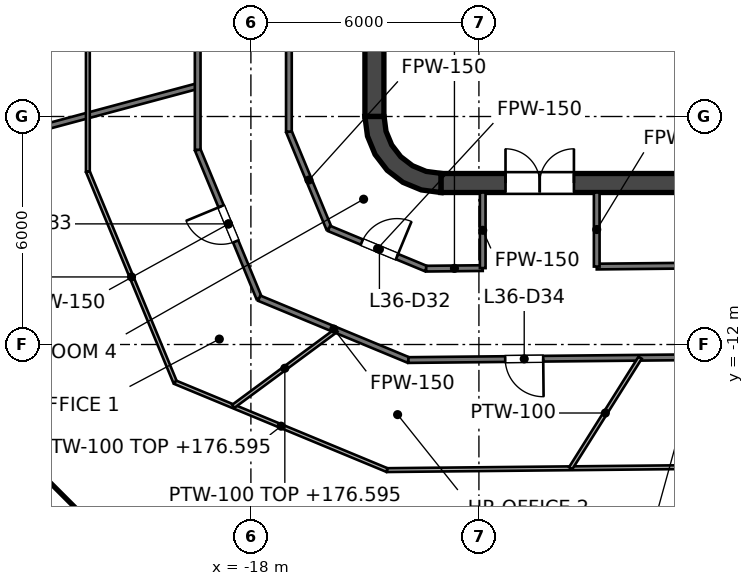
"""IFC4 building model, lengths in metres.
Left out: names, types, materials, properties, quantities, classifications, styles, units other than length and angle.
Written with IfcOpenShell. Run it as: python <this file> out.ifc"""

import sys

from ifc_helpers import new_model, si_unit, direction, frame, frame_2d, origin, place, context, subcontext, project, spatial, polyline, rectangle, outline, extrude, element, fill, save


model = new_model("IFC4")
c1 = context("Model", 3, precision=1e-05, world=origin(), true_north=direction((0.0, 1.0)))
c2 = subcontext(c1, "Body", "Model", "MODEL_VIEW")
j1 = project(units=[si_unit("LENGTHUNIT", "METRE"), si_unit("PLANEANGLEUNIT", "RADIAN")], contexts=[c1])
p1 = place(None, origin())
s1 = spatial("IfcSite", under=j1, at=p1, CompositionType="ELEMENT")
p2 = place(p1, origin())
s2 = spatial("IfcBuilding", under=s1, at=p2, CompositionType="ELEMENT")
p3 = place(p2, frame((0.0, 0.0, 173.6)))
s3 = spatial("IfcBuildingStorey", under=s2, at=p3, CompositionType="ELEMENT", Elevation=173.6)
p4 = place(p3, frame((-13.0, -7.75, 0.0), z_axis=(0.0, 0.0, 1.0), x_axis=(1.0, 0.0, 0.0)))
e1 = element("IfcWall", 1, at=p4, inside=s3, PredefinedType="SHEAR", context=c2, shape_type="SweptSolid", body=[
    extrude(rectangle(XDim=26.0, YDim=0.5, at=frame_2d((13.0, 0.0))), origin(), (0.0, 0.0, 1.0), 4.0),
])
p5 = place(p4, frame((1.7, 0.0, 0.0)))
e2 = element("IfcOpeningElement", 2, at=p5, cuts=e1, PredefinedType="OPENING", context=c2, shape_type="SweptSolid", body=[
    extrude(rectangle(XDim=1.8, YDim=2.1, at=frame_2d((0.9, 1.05))), frame((0.0, 0.25, 0.0), z_axis=(0.0, -1.0, 0.0), x_axis=(1.0, 0.0, 0.0)), (0.0, 0.0, 1.0), 0.5),
])
p6 = place(p4, frame((22.5, 0.0, 0.0)))
e3 = element("IfcOpeningElement", 3, at=p6, cuts=e1, PredefinedType="OPENING", context=c2, shape_type="SweptSolid", body=[
    extrude(rectangle(XDim=1.8, YDim=2.1, at=frame_2d((0.9, 1.05))), frame((0.0, 0.25, 0.0), z_axis=(0.0, -1.0, 0.0), x_axis=(1.0, 0.0, 0.0)), (0.0, 0.0, 1.0), 0.5),
])
p7 = place(p3, frame((-14.75, -6.0, 0.0), z_axis=(0.0, 0.0, 1.0), x_axis=(0.0, 1.0, 0.0)))
e4 = element("IfcWall", 4, at=p7, inside=s3, PredefinedType="SHEAR", context=c2, shape_type="SweptSolid", body=[
    extrude(rectangle(XDim=12.0, YDim=0.5, at=frame_2d((6.0, 0.0))), origin(), (0.0, 0.0, 1.0), 4.0),
])
p8 = place(p3, origin())
e5 = element("IfcWall", 5, at=p8, inside=s3, PredefinedType="SHEAR", context=c2, shape_type="SweptSolid", body=[
    extrude(outline(polyline([(-13.0, -8.0), (-13.0, -7.496), (-13.387, -7.445), (-13.748, -7.295), (-14.058, -7.058), (-14.295, -6.748), (-14.445, -6.387), (-14.496, -6.0), (-15.0, -6.0), (-14.932, -6.518), (-14.732, -7.0), (-14.414, -7.414), (-14.0, -7.732), (-13.518, -7.932), (-13.0, -8.0)])), origin(), (0.0, 0.0, 1.0), 4.0),
])
p9 = place(p3, frame((-9.0, -6.6, 0.0), z_axis=(0.0, 0.0, 1.0), x_axis=(0.0, 1.0, 0.0)))
e6 = element("IfcWall", 6, at=p9, inside=s3, PredefinedType="PARTITIONING", context=c2, shape_type="SweptSolid", body=[
    extrude(rectangle(XDim=2.5, YDim=0.25, at=frame_2d((1.25, 0.0))), origin(), (0.0, 0.0, 1.0), 3.85),
])
p10 = place(p9, frame((0.75, 0.0, 0.0)))
e7 = element("IfcOpeningElement", 7, at=p10, cuts=e6, PredefinedType="OPENING", context=c2, shape_type="SweptSolid", body=[
    extrude(rectangle(XDim=1.0, YDim=2.1, at=frame_2d((0.5, 1.05))), frame((0.0, 0.125, 0.0), z_axis=(0.0, -1.0, 0.0), x_axis=(1.0, 0.0, 0.0)), (0.0, 0.0, 1.0), 0.25),
])
p11 = place(p3, frame((-9.125, -7.05, 0.0), z_axis=(0.0, 0.0, 1.0), x_axis=(1.0, 0.0, 0.0)))
e8 = element("IfcWall", 8, at=p11, inside=s3, PredefinedType="SOLIDWALL", context=c2, shape_type="SweptSolid", body=[
    extrude(rectangle(XDim=18.25, YDim=0.9, at=frame_2d((9.125, 0.0))), origin(), (0.0, 0.0, 1.0), 3.85),
])
p12 = place(p3, frame((-11.8, -7.5, 0.0), z_axis=(0.0, 0.0, 1.0), x_axis=(0.0, 1.0, 0.0)))
e9 = element("IfcWall", 9, at=p12, inside=s3, PredefinedType="SOLIDWALL", context=c2, shape_type="SweptSolid", body=[
    extrude(rectangle(XDim=15.0, YDim=0.4, at=frame_2d((7.5, 0.0))), origin(), (0.0, 0.0, 1.0), 3.85),
])
p13 = place(p12, frame((11.3, 0.0, 0.0)))
e10 = element("IfcOpeningElement", 10, at=p13, cuts=e9, PredefinedType="OPENING", context=c2, shape_type="SweptSolid", body=[
    extrude(rectangle(XDim=1.1, YDim=2.1, at=frame_2d((0.55, 1.05))), frame((0.0, 0.2, 0.0), z_axis=(0.0, -1.0, 0.0), x_axis=(1.0, 0.0, 0.0)), (0.0, 0.0, 1.0), 0.4),
])
p14 = place(p12, frame((8.4, 0.0, 0.0)))
e11 = element("IfcOpeningElement", 11, at=p14, cuts=e9, PredefinedType="OPENING", context=c2, shape_type="SweptSolid", body=[
    extrude(rectangle(XDim=1.1, YDim=2.1, at=frame_2d((0.55, 1.05))), frame((0.0, 0.2, 0.0), z_axis=(0.0, -1.0, 0.0), x_axis=(1.0, 0.0, 0.0)), (0.0, 0.0, 1.0), 0.4),
])
p15 = place(p12, frame((5.5, 0.0, 0.0)))
e12 = element("IfcOpeningElement", 12, at=p15, cuts=e9, PredefinedType="OPENING", context=c2, shape_type="SweptSolid", body=[
    extrude(rectangle(XDim=1.1, YDim=2.1, at=frame_2d((0.55, 1.05))), frame((0.0, 0.2, 0.0), z_axis=(0.0, -1.0, 0.0), x_axis=(1.0, 0.0, 0.0)), (0.0, 0.0, 1.0), 0.4),
])
p16 = place(p12, frame((13.697, 0.0, 0.0)))
e13 = element("IfcOpeningElement", 13, at=p16, cuts=e9, PredefinedType="OPENING", context=c2, shape_type="SweptSolid", body=[
    extrude(rectangle(XDim=0.9, YDim=2.1, at=frame_2d((0.45, 1.05))), frame((0.0, 0.2, 0.0), z_axis=(0.0, -1.0, 0.0), x_axis=(1.0, 0.0, 0.0)), (0.0, 0.0, 1.0), 0.4),
])
p17 = place(p12, frame((0.403, 0.0, 0.0)))
e14 = element("IfcOpeningElement", 14, at=p17, cuts=e9, PredefinedType="OPENING", context=c2, shape_type="SweptSolid", body=[
    extrude(rectangle(XDim=0.9, YDim=2.1, at=frame_2d((0.45, 1.05))), frame((0.0, 0.2, 0.0), z_axis=(0.0, -1.0, 0.0), x_axis=(1.0, 0.0, 0.0)), (0.0, 0.0, 1.0), 0.4),
])
e15 = element("IfcWall", 15, at=p8, inside=s3, PredefinedType="SOLIDWALL", context=c2, shape_type="SweptSolid", body=[
    extrude(outline(polyline([(-12.0, -5.925), (-12.0, -5.675), (-14.25, -5.675), (-14.25, -3.025), (-12.0, -3.025), (-12.0, -2.775), (-14.25, -2.775), (-14.25, -0.125), (-12.0, -0.125), (-12.0, 0.125), (-14.25, 0.125), (-14.25, 2.775), (-12.0, 2.775), (-12.0, 3.025), (-14.25, 3.025), (-14.25, 5.675), (-12.0, 5.675), (-12.0, 5.925), (-14.25, 5.925), (-14.5, 5.925), (-14.5, 5.675), (-14.5, 3.025), (-14.5, 2.775), (-14.5, 0.125), (-14.5, -0.125), (-14.5, -2.775), (-14.5, -3.025), (-14.5, -5.675), (-14.5, -5.925), (-14.25, -5.925), (-12.0, -5.925)])), origin(), (0.0, 0.0, 1.0), 3.85),
])
p18 = place(p3, frame((-19.4, -6.876, 0.0), z_axis=(0.0, 0.0, 1.0), x_axis=(0.382843135608, -0.92381336509, 0.0)))
e16 = element("IfcWall", 16, at=p18, inside=s3, PredefinedType="PARTITIONING", context=c2, shape_type="SweptSolid", body=[
    extrude(rectangle(XDim=4.227, YDim=0.15, at=frame_2d((2.114, 0.0))), origin(), (0.0, 0.0, 1.0), 2.995),
])
p19 = place(p18, frame((1.61, 0.0, 0.0)))
e17 = element("IfcOpeningElement", 17, at=p19, cuts=e16, PredefinedType="OPENING", context=c2, shape_type="SweptSolid", body=[
    extrude(rectangle(XDim=1.0, YDim=2.1, at=frame_2d((0.5, 1.05))), frame((0.0, 0.075, 0.0), z_axis=(0.0, -1.0, 0.0), x_axis=(1.0, 0.0, 0.0)), (0.0, 0.0, 1.0), 0.15),
])
p20 = place(p3, frame((-17.0, -6.398, 0.0), z_axis=(0.0, 0.0, 1.0), x_axis=(0.382828866893, -0.923819278146, 0.0)))
e18 = element("IfcWall", 18, at=p20, inside=s3, PredefinedType="PARTITIONING", context=c2, shape_type="SweptSolid", body=[
    extrude(rectangle(XDim=2.757, YDim=0.15, at=frame_2d((1.378, 0.0))), origin(), (0.0, 0.0, 1.0), 2.995),
])
p21 = place(p3, frame((-17.781, -10.781, 0.0), z_axis=(0.0, 0.0, 1.0), x_axis=(0.923785728675, -0.3829098164, 0.0)))
e19 = element("IfcWall", 19, at=p21, inside=s3, PredefinedType="PARTITIONING", context=c2, shape_type="SweptSolid", body=[
    extrude(rectangle(XDim=4.25, YDim=0.15, at=frame_2d((2.125, 0.0))), origin(), (0.0, 0.0, 1.0), 2.995),
])
p22 = place(p3, frame((-15.945, -8.945, 0.0), z_axis=(0.0, 0.0, 1.0), x_axis=(0.92378777743, -0.382904873658, 0.0)))
e20 = element("IfcWall", 20, at=p22, inside=s3, PredefinedType="PARTITIONING", context=c2, shape_type="SweptSolid", body=[
    extrude(rectangle(XDim=2.768, YDim=0.15, at=frame_2d((1.384, 0.0))), origin(), (0.0, 0.0, 1.0), 2.995),
])
p23 = place(p22, frame((0.936, 0.0, 0.0)))
e21 = element("IfcOpeningElement", 21, at=p23, cuts=e20, PredefinedType="OPENING", context=c2, shape_type="SweptSolid", body=[
    extrude(rectangle(XDim=1.0, YDim=2.1, at=frame_2d((0.5, 1.05))), frame((0.0, 0.075, 0.0), z_axis=(0.0, -1.0, 0.0), x_axis=(1.0, 0.0, 0.0)), (0.0, 0.0, 1.0), 0.15),
])
p24 = place(p3, frame((-13.855, -12.409, 0.0), z_axis=(0.0, 0.0, 1.0), x_axis=(0.999950929766, 0.009906465589, 0.0)))
e22 = element("IfcWall", 22, at=p24, inside=s3, PredefinedType="PARTITIONING", context=c2, shape_type="SweptSolid", body=[
    extrude(rectangle(XDim=30.411, YDim=0.15, at=frame_2d((15.206, 0.0))), origin(), (0.0, 0.0, 1.0), 2.927),
])
p25 = place(p24, frame((2.547, 0.0, 0.0)))
e23 = element("IfcOpeningElement", 23, at=p25, cuts=e22, PredefinedType="OPENING", context=c2, shape_type="SweptSolid", body=[
    extrude(rectangle(XDim=1.0, YDim=2.1, at=frame_2d((0.5, 1.05))), frame((0.0, 0.075, 0.0), z_axis=(0.0, -1.0, 0.0), x_axis=(1.0, 0.0, 0.0)), (0.0, 0.0, 1.0), 0.15),
])
p26 = place(p24, frame((9.526, 0.0, 0.0)))
e24 = element("IfcOpeningElement", 24, at=p26, cuts=e22, PredefinedType="OPENING", context=c2, shape_type="SweptSolid", body=[
    extrude(rectangle(XDim=1.0, YDim=2.1, at=frame_2d((0.5, 1.05))), frame((0.0, 0.075, 0.0), z_axis=(0.0, -1.0, 0.0), x_axis=(1.0, 0.0, 0.0)), (0.0, 0.0, 1.0), 0.15),
])
p27 = place(p24, frame((14.419, 0.0, 0.0)))
e25 = element("IfcOpeningElement", 25, at=p27, cuts=e22, PredefinedType="OPENING", context=c2, shape_type="SweptSolid", body=[
    extrude(rectangle(XDim=1.0, YDim=2.1, at=frame_2d((0.5, 1.05))), frame((0.0, 0.075, 0.0), z_axis=(0.0, -1.0, 0.0), x_axis=(1.0, 0.0, 0.0)), (0.0, 0.0, 1.0), 0.15),
])
p28 = place(p24, frame((22.694, 0.0, 0.0)))
e26 = element("IfcOpeningElement", 26, at=p28, cuts=e22, PredefinedType="OPENING", context=c2, shape_type="SweptSolid", body=[
    extrude(rectangle(XDim=1.0, YDim=2.1, at=frame_2d((0.5, 1.05))), frame((0.0, 0.075, 0.0), z_axis=(0.0, -1.0, 0.0), x_axis=(1.0, 0.0, 0.0)), (0.0, 0.0, 1.0), 0.15),
])
p29 = place(p3, frame((-13.388, -10.004, 0.0), z_axis=(0.0, 0.0, 1.0), x_axis=(0.999951550029, 0.009843657588, 0.0)))
e27 = element("IfcWall", 27, at=p29, inside=s3, PredefinedType="PARTITIONING", context=c2, shape_type="SweptSolid", body=[
    extrude(rectangle(XDim=1.488, YDim=0.15, at=frame_2d((0.744, 0.0))), origin(), (0.0, 0.0, 1.0), 2.995),
])
p30 = place(p3, frame((-8.9, -9.949, 0.0), z_axis=(0.0, 0.0, 1.0), x_axis=(0.999950969978, 0.009902405776, 0.0)))
e28 = element("IfcWall", 28, at=p30, inside=s3, PredefinedType="PARTITIONING", context=c2, shape_type="SweptSolid", body=[
    extrude(rectangle(XDim=17.801, YDim=0.15, at=frame_2d((8.9, 0.0))), origin(), (0.0, 0.0, 1.0), 2.927),
])
p31 = place(p30, frame((3.9, 0.0, 0.0)))
e29 = element("IfcOpeningElement", 29, at=p31, cuts=e28, PredefinedType="OPENING", context=c2, shape_type="SweptSolid", body=[
    extrude(rectangle(XDim=1.0, YDim=2.1, at=frame_2d((0.5, 1.05))), frame((0.0, 0.075, 0.0), z_axis=(0.0, -1.0, 0.0), x_axis=(1.0, 0.0, 0.0)), (0.0, 0.0, 1.0), 0.15),
])
p32 = place(p30, frame((12.801, 0.0, 0.0)))
e30 = element("IfcOpeningElement", 30, at=p32, cuts=e28, PredefinedType="OPENING", context=c2, shape_type="SweptSolid", body=[
    extrude(rectangle(XDim=1.0, YDim=2.1, at=frame_2d((0.5, 1.05))), frame((0.0, 0.075, 0.0), z_axis=(0.0, -1.0, 0.0), x_axis=(1.0, 0.0, 0.0)), (0.0, 0.0, 1.0), 0.15),
])
p33 = place(p3, frame((-29.399, -7.877, 0.0), z_axis=(0.0, 0.0, 1.0), x_axis=(0.965938367102, 0.258772237617, 0.0)))
e31 = element("IfcWall", 31, at=p33, inside=s3, PredefinedType="PARTITIONING", context=c2, shape_type="SweptSolid", body=[
    extrude(rectangle(XDim=10.352, YDim=0.15, at=frame_2d((5.176, 0.0))), origin(), (0.0, 0.0, 1.0), 3.527),
])
p34 = place(p3, frame((-8.9, -9.949, 0.0), z_axis=(0.0, 0.0, 1.0), x_axis=(0.0, 1.0, 0.0)))
e32 = element("IfcWall", 32, at=p34, inside=s3, PredefinedType="PARTITIONING", context=c2, shape_type="SweptSolid", body=[
    extrude(rectangle(XDim=1.949, YDim=0.15, at=frame_2d((0.975, 0.0))), origin(), (0.0, 0.0, 1.0), 3.076),
])
p35 = place(p3, frame((-11.9, -9.989, 0.0), z_axis=(0.0, 0.0, 1.0), x_axis=(0.0, 1.0, 0.0)))
e33 = element("IfcWall", 33, at=p35, inside=s3, PredefinedType="PARTITIONING", context=c2, shape_type="SweptSolid", body=[
    extrude(rectangle(XDim=1.989, YDim=0.15, at=frame_2d((0.995, 0.0))), origin(), (0.0, 0.0, 1.0), 2.995),
])
p36 = place(p3, frame((-17.0, -6.398, 0.0), z_axis=(0.0, 0.0, 1.0), x_axis=(0.0, 1.0, 0.0)))
e34 = element("IfcWall", 34, at=p36, inside=s3, PredefinedType="PARTITIONING", context=c2, shape_type="SweptSolid", body=[
    extrude(rectangle(XDim=12.934, YDim=0.15, at=frame_2d((6.467, 0.0))), origin(), (0.0, 0.0, 1.0), 2.927),
])
p37 = place(p36, frame((5.742, 0.0, 0.0)))
e35 = element("IfcOpeningElement", 35, at=p37, cuts=e34, PredefinedType="OPENING", context=c2, shape_type="SweptSolid", body=[
    extrude(rectangle(XDim=1.0, YDim=2.1, at=frame_2d((0.5, 1.05))), frame((0.0, 0.075, 0.0), z_axis=(0.0, -1.0, 0.0), x_axis=(1.0, 0.0, 0.0)), (0.0, 0.0, 1.0), 0.15),
])
p38 = place(p3, frame((-19.4, -6.876, 0.0), z_axis=(0.0, 0.0, 1.0), x_axis=(0.0, 1.0, 0.0)))
e36 = element("IfcWall", 36, at=p38, inside=s3, PredefinedType="PARTITIONING", context=c2, shape_type="SweptSolid", body=[
    extrude(rectangle(XDim=14.055, YDim=0.15, at=frame_2d((7.027, 0.0))), origin(), (0.0, 0.0, 1.0), 2.927),
])
p39 = place(p38, frame((7.316, 0.0, 0.0)))
e37 = element("IfcOpeningElement", 37, at=p39, cuts=e36, PredefinedType="OPENING", context=c2, shape_type="SweptSolid", body=[
    extrude(rectangle(XDim=1.0, YDim=2.1, at=frame_2d((0.5, 1.05))), frame((0.0, 0.075, 0.0), z_axis=(0.0, -1.0, 0.0), x_axis=(1.0, 0.0, 0.0)), (0.0, 0.0, 1.0), 0.15),
])
p40 = place(p3, frame((-22.29, -7.451, 0.0), z_axis=(0.0, 0.0, 1.0), x_axis=(0.38290406786, -0.923788111428, 0.0)))
e38 = element("IfcWall", 38, at=p40, inside=s3, PredefinedType="PARTITIONING", context=c2, shape_type="SweptSolid", body=[
    extrude(rectangle(XDim=5.999, YDim=0.1, at=frame_2d((3.0, 0.0))), origin(), (0.0, 0.0, 1.0), 2.995),
])
p41 = place(p3, frame((-19.993, -12.993, 0.0), z_axis=(0.0, 0.0, 1.0), x_axis=(0.923739670385, -0.383020915038, 0.0)))
e39 = element("IfcWall", 39, at=p41, inside=s3, PredefinedType="PARTITIONING", context=c2, shape_type="SweptSolid", body=[
    extrude(rectangle(XDim=6.036, YDim=0.1, at=frame_2d((3.018, 0.0))), origin(), (0.0, 0.0, 1.0), 2.995),
])
p42 = place(p3, frame((-14.417, -15.305, 0.0), z_axis=(0.0, 0.0, 1.0), x_axis=(0.999950476631, 0.009952099574, 0.0)))
e40 = element("IfcWall", 40, at=p42, inside=s3, PredefinedType="PARTITIONING", context=c2, shape_type="SweptSolid", body=[
    extrude(rectangle(XDim=32.652, YDim=0.1, at=frame_2d((16.326, 0.0))), origin(), (0.0, 0.0, 1.0), 2.927),
])
p43 = place(p42, frame((8.672, 0.0, 0.0)))
e41 = element("IfcOpeningElement", 41, at=p43, cuts=e40, PredefinedType="OPENING", context=c2, shape_type="SweptSolid", body=[
    extrude(rectangle(XDim=1.8, YDim=2.1, at=frame_2d((0.9, 1.05))), frame((0.0, 0.05, 0.0), z_axis=(0.0, -1.0, 0.0), x_axis=(1.0, 0.0, 0.0)), (0.0, 0.0, 1.0), 0.1),
])
p44 = place(p42, frame((23.948, 0.0, 0.0)))
e42 = element("IfcOpeningElement", 42, at=p44, cuts=e40, PredefinedType="OPENING", context=c2, shape_type="SweptSolid", body=[
    extrude(rectangle(XDim=1.8, YDim=2.1, at=frame_2d((0.9, 1.05))), frame((0.0, 0.05, 0.0), z_axis=(0.0, -1.0, 0.0), x_axis=(1.0, 0.0, 0.0)), (0.0, 0.0, 1.0), 0.1),
])
p45 = place(p3, frame((-18.464, -13.627, 0.0), z_axis=(0.0, 0.0, 1.0), x_axis=(0.804484337507, 0.593973863655, 0.0)))
e43 = element("IfcWall", 43, at=p45, inside=s3, PredefinedType="PARTITIONING", context=c2, shape_type="SweptSolid", body=[
    extrude(rectangle(XDim=3.374, YDim=0.1, at=frame_2d((1.687, 0.0))), origin(), (0.0, 0.0, 1.0), 2.995),
])
p46 = place(p3, frame((-9.587, -15.257, 0.0), z_axis=(0.0, 0.0, 1.0), x_axis=(0.532015822643, 0.846734411996, 0.0)))
e44 = element("IfcWall", 44, at=p46, inside=s3, PredefinedType="PARTITIONING", context=c2, shape_type="SweptSolid", body=[
    extrude(rectangle(XDim=3.436, YDim=0.1, at=frame_2d((1.718, 0.0))), origin(), (0.0, 0.0, 1.0), 3.85),
])
p47 = place(p3, frame((-22.29, -7.451, 0.0), z_axis=(0.0, 0.0, 1.0), x_axis=(0.0, 1.0, 0.0)))
e45 = element("IfcWall", 45, at=p47, inside=s3, PredefinedType="PARTITIONING", context=c2, shape_type="SweptSolid", body=[
    extrude(rectangle(XDim=14.642, YDim=0.1, at=frame_2d((7.321, 0.0))), origin(), (0.0, 0.0, 1.0), 2.927),
])
p48 = place(p47, frame((7.611, 0.0, 0.0)))
e46 = element("IfcOpeningElement", 46, at=p48, cuts=e45, PredefinedType="OPENING", context=c2, shape_type="SweptSolid", body=[
    extrude(rectangle(XDim=0.9, YDim=2.1, at=frame_2d((0.45, 1.05))), frame((0.0, 0.05, 0.0), z_axis=(0.0, -1.0, 0.0), x_axis=(1.0, 0.0, 0.0)), (0.0, 0.0, 1.0), 0.1),
])
p49 = place(p10, origin())
e47 = element("IfcDoor", 47, at=p49, inside=s3, OperationType="SINGLE_SWING_LEFT", PredefinedType="DOOR", context=c2, shape_type="SweptSolid", body=[
    extrude(rectangle(XDim=1.0, YDim=2.1, at=frame_2d((0.5, 1.05))), frame((0.0, 0.025, 0.0), z_axis=(0.0, -1.0, 0.0), x_axis=(1.0, 0.0, 0.0)), (0.0, 0.0, 1.0), 0.05),
])
fill(e7, e47)
p50 = place(p17, origin())
e48 = element("IfcDoor", 48, at=p50, inside=s3, OperationType="SINGLE_SWING_LEFT", PredefinedType="DOOR", context=c2, shape_type="SweptSolid", body=[
    extrude(rectangle(XDim=0.9, YDim=2.1, at=frame_2d((0.45, 1.05))), frame((0.0, 0.025, 0.0), z_axis=(0.0, -1.0, 0.0), x_axis=(1.0, 0.0, 0.0)), (0.0, 0.0, 1.0), 0.05),
])
fill(e14, e48)
p51 = place(p5, origin())
e49 = element("IfcDoor", 49, at=p51, inside=s3, OperationType="DOUBLE_DOOR_SINGLE_SWING", PredefinedType="DOOR", context=c2, shape_type="SweptSolid", body=[
    extrude(rectangle(XDim=1.8, YDim=2.1, at=frame_2d((0.9, 1.05))), frame((0.0, 0.025, 0.0), z_axis=(0.0, -1.0, 0.0), x_axis=(1.0, 0.0, 0.0)), (0.0, 0.0, 1.0), 0.05),
])
fill(e2, e49)
p52 = place(p23, origin())
e50 = element("IfcDoor", 50, at=p52, inside=s3, OperationType="SINGLE_SWING_RIGHT", PredefinedType="DOOR", context=c2, shape_type="SweptSolid", body=[
    extrude(rectangle(XDim=1.0, YDim=2.1, at=frame_2d((0.5, 1.05))), frame((0.0, 0.025, 0.0), z_axis=(0.0, -1.0, 0.0), x_axis=(1.0, 0.0, 0.0)), (0.0, 0.0, 1.0), 0.05),
])
fill(e21, e50)
p53 = place(p19, origin())
e51 = element("IfcDoor", 51, at=p53, inside=s3, OperationType="SINGLE_SWING_LEFT", PredefinedType="DOOR", context=c2, shape_type="SweptSolid", body=[
    extrude(rectangle(XDim=1.0, YDim=2.1, at=frame_2d((0.5, 1.05))), frame((0.0, 0.025, 0.0), z_axis=(0.0, -1.0, 0.0), x_axis=(1.0, 0.0, 0.0)), (0.0, 0.0, 1.0), 0.05),
])
fill(e17, e51)
p54 = place(p25, origin())
e52 = element("IfcDoor", 52, at=p54, inside=s3, OperationType="SINGLE_SWING_RIGHT", PredefinedType="DOOR", context=c2, shape_type="SweptSolid", body=[
    extrude(rectangle(XDim=1.0, YDim=2.1, at=frame_2d((0.5, 1.05))), frame((0.0, 0.025, 0.0), z_axis=(0.0, -1.0, 0.0), x_axis=(1.0, 0.0, 0.0)), (0.0, 0.0, 1.0), 0.05),
])
fill(e23, e52)
save(model, sys.argv[1])
